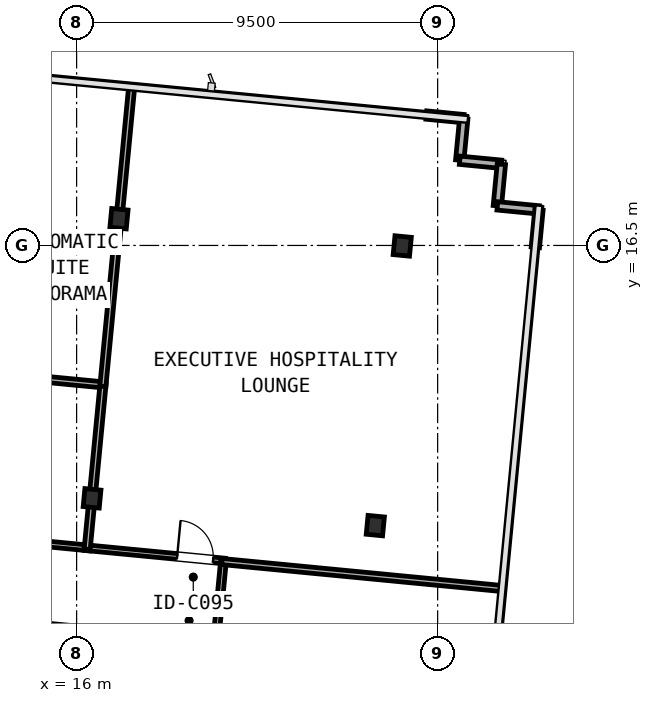
"""IFC4 building model, lengths in metres.
Left out: names, types, materials, properties, quantities, classifications, styles, units other than length and angle.
Written with IfcOpenShell. Run it as: python <this file> out.ifc"""

import sys

from ifc_helpers import new_model, si_unit, direction, frame, frame_2d, origin, origin_2d, place, context, subcontext, project, spatial, rectangle, i_section, extrude, element, fill, save


model = new_model("IFC4")
c1 = context("Model", 3, precision=1e-05, world=origin(), true_north=direction((0.0, 1.0)))
c2 = subcontext(c1, "Body", "Model", "MODEL_VIEW")
j1 = project(units=[si_unit("LENGTHUNIT", "METRE"), si_unit("PLANEANGLEUNIT", "RADIAN")], contexts=[c1])
p1 = place(None, origin())
s1 = spatial("IfcSite", under=j1, at=p1, CompositionType="ELEMENT")
p2 = place(p1, origin())
s2 = spatial("IfcBuilding", under=s1, at=p2, CompositionType="ELEMENT")
p3 = place(p2, frame((0.0, 0.0, 163.5)))
s3 = spatial("IfcBuildingStorey", under=s2, at=p3, CompositionType="ELEMENT", Elevation=163.5)
p4 = place(p3, frame((16.406, 9.846, 0.0), z_axis=(0.0, 0.0, 1.0), x_axis=(0.995396198367, -0.09584575252, 0.0)))
e1 = element("IfcColumn", 1, at=p4, inside=s3, PredefinedType="COLUMN", context=c2, shape_type="SweptSolid", body=[
    extrude(i_section(OverallWidth=0.424, OverallDepth=0.474, WebThickness=0.048, FlangeThickness=0.077, FilletRadius=0.031, at=origin_2d()), origin(), (0.0, 0.0, 1.0), 3.45),
])
for number, where, z_axis, x_axis in (
    (2, (17.115, 17.204, 0.0), (0.0, 0.0, 1.0), (0.995, -0.096, 0.0)),
    (3, (23.86, 9.128, 0.0), (0.0, 0.0, 1.0), (0.995, -0.096, 0.0)),
    (4, (24.568, 16.486, 0.0), (0.0, 0.0, 1.0), (0.995, -0.096, 0.0)),
):
    element("IfcColumn", number, at=place(p3, frame(where, z_axis=z_axis, x_axis=x_axis)), inside=s3, PredefinedType="COLUMN", context=c2, shape_type="SweptSolid", body=[
        extrude(i_section(OverallWidth=0.432, OverallDepth=0.498, WebThickness=0.056, FlangeThickness=0.089, FilletRadius=0.031, at=origin_2d()), origin(), (0.0, 0.0, 1.0), 3.45),
    ])
p5 = place(p3, frame((25.201, 19.931, 0.0), z_axis=(0.0, 0.0, 1.0), x_axis=(0.99541083642, -0.095693608655, 0.0)))
e5 = element("IfcWall", 5, at=p5, inside=s3, PredefinedType="STANDARD", context=c2, shape_type="SweptSolid", body=[
    extrude(rectangle(XDim=0.99, YDim=0.22, at=frame_2d((0.495, 0.0))), origin(), (0.0, 0.0, 1.0), 3.19),
])
p6 = place(p3, frame((26.187, 19.837, 0.0), z_axis=(0.0, 0.0, 1.0), x_axis=(-0.095657429048, -0.995414313875, 0.0)))
e6 = element("IfcWall", 6, at=p6, inside=s3, PredefinedType="STANDARD", context=c2, shape_type="SweptSolid", body=[
    extrude(rectangle(XDim=1.1, YDim=0.22, at=frame_2d((0.55, 0.0))), origin(), (0.0, 0.0, 1.0), 3.19),
])
p7 = place(p3, frame((26.082, 18.742, 0.0), z_axis=(0.0, 0.0, 1.0), x_axis=(0.995391116058, -0.095898519656, 0.0)))
e7 = element("IfcWall", 7, at=p7, inside=s3, PredefinedType="STANDARD", context=c2, shape_type="SweptSolid", body=[
    extrude(rectangle(XDim=1.1, YDim=0.22, at=frame_2d((0.55, 0.0))), origin(), (0.0, 0.0, 1.0), 3.19),
])
p8 = place(p3, frame((27.176, 18.636, 0.0), z_axis=(0.0, 0.0, 1.0), x_axis=(-0.095657429048, -0.995414313875, 0.0)))
e8 = element("IfcWall", 8, at=p8, inside=s3, PredefinedType="STANDARD", context=c2, shape_type="SweptSolid", body=[
    extrude(rectangle(XDim=1.1, YDim=0.22, at=frame_2d((0.55, 0.0))), origin(), (0.0, 0.0, 1.0), 3.19),
])
p9 = place(p3, frame((27.071, 17.541, 0.0), z_axis=(0.0, 0.0, 1.0), x_axis=(0.995391116058, -0.095898519656, 0.0)))
e9 = element("IfcWall", 9, at=p9, inside=s3, PredefinedType="STANDARD", context=c2, shape_type="SweptSolid", body=[
    extrude(rectangle(XDim=1.1, YDim=0.22, at=frame_2d((0.55, 0.0))), origin(), (0.0, 0.0, 1.0), 3.19),
])
p10 = place(p3, frame((28.166, 17.436, 0.0), z_axis=(0.0, 0.0, 1.0), x_axis=(-0.095693608655, -0.99541083642, 0.0)))
e10 = element("IfcWall", 10, at=p10, inside=s3, PredefinedType="STANDARD", context=c2, shape_type="SweptSolid", body=[
    extrude(rectangle(XDim=0.99, YDim=0.22, at=frame_2d((0.495, 0.0))), origin(), (0.0, 0.0, 1.0), 3.19),
])
p11 = place(p3, frame((8.28, 9.314, 0.0), z_axis=(0.0, 0.0, 1.0), x_axis=(0.995395467524, -0.095853342309, 0.0)))
e11 = element("IfcWall", 11, at=p11, inside=s3, PredefinedType="PARTITIONING", context=c2, shape_type="SweptSolid", body=[
    extrude(rectangle(XDim=8.12, YDim=0.15, at=frame_2d((4.06, 0.0))), origin(), (0.0, 0.0, 1.0), 2.479),
])
p12 = place(p11, frame((3.585, 0.0, 0.0)))
e12 = element("IfcOpeningElement", 12, at=p12, cuts=e11, PredefinedType="OPENING", context=c2, shape_type="SweptSolid", body=[
    extrude(rectangle(XDim=0.95, YDim=2.15, at=frame_2d((0.475, 1.075))), frame((0.0, 0.085, 0.0), z_axis=(0.0, -1.0, 0.0), x_axis=(1.0, 0.0, 0.0)), (0.0, 0.0, 1.0), 0.17),
])
p13 = place(p3, frame((16.199, 8.552, 0.0), z_axis=(0.0, 0.0, 1.0), x_axis=(0.995391104887, -0.095898635608, 0.0)))
e13 = element("IfcWall", 13, at=p13, inside=s3, PredefinedType="PARTITIONING", context=c2, shape_type="SweptSolid", body=[
    extrude(rectangle(XDim=3.722, YDim=0.15, at=frame_2d((1.861, 0.0))), origin(), (0.0, 0.0, 1.0), 2.479),
])
p14 = place(p13, frame((2.457, 0.0, 0.0)))
e14 = element("IfcOpeningElement", 14, at=p14, cuts=e13, PredefinedType="OPENING", context=c2, shape_type="SweptSolid", body=[
    extrude(rectangle(XDim=0.95, YDim=2.15, at=frame_2d((0.475, 1.075))), frame((0.0, 0.085, 0.0), z_axis=(0.0, -1.0, 0.0), x_axis=(1.0, 0.0, 0.0)), (0.0, 0.0, 1.0), 0.17),
])
p15 = place(p3, frame((16.156, 6.396, 0.0), z_axis=(0.0, 0.0, 1.0), x_axis=(-0.99539478422, 0.095860437863, 0.0)))
e15 = element("IfcWall", 15, at=p15, inside=s3, PredefinedType="PARTITIONING", context=c2, shape_type="SweptSolid", body=[
    extrude(rectangle(XDim=10.936, YDim=0.15, at=frame_2d((5.468, 0.0))), origin(), (0.0, 0.0, 1.0), 2.479),
])
p16 = place(p15, frame((3.675, 0.0, 0.0)))
e16 = element("IfcOpeningElement", 16, at=p16, cuts=e15, PredefinedType="OPENING", context=c2, shape_type="SweptSolid", body=[
    extrude(rectangle(XDim=0.85, YDim=2.05, at=frame_2d((0.425, 1.025))), frame((0.0, 0.085, 0.0), z_axis=(0.0, -1.0, 0.0), x_axis=(1.0, 0.0, 0.0)), (0.0, 0.0, 1.0), 0.17),
])
p17 = place(p3, frame((19.866, 8.219, 0.0), z_axis=(0.0, 0.0, 1.0), x_axis=(-0.095773447772, -0.995403157872, 0.0)))
e17 = element("IfcWall", 17, at=p17, inside=s3, PredefinedType="PARTITIONING", context=c2, shape_type="SweptSolid", body=[
    extrude(rectangle(XDim=2.21, YDim=0.15, at=frame_2d((1.105, 0.0))), origin(), (0.0, 0.0, 1.0), 2.718),
])
p18 = place(p3, frame((12.684, 13.218, 0.0), z_axis=(0.0, 0.0, 1.0), x_axis=(0.995396485523, -0.095842770251, 0.0)))
e18 = element("IfcWall", 18, at=p18, inside=s3, PredefinedType="PARTITIONING", context=c2, shape_type="SweptSolid", body=[
    extrude(rectangle(XDim=4.068, YDim=0.16, at=frame_2d((2.034, 0.0))), origin(), (0.0, 0.0, 1.0), 2.479),
])
p19 = place(p18, frame((0.386, 0.0, 0.0)))
e19 = element("IfcOpeningElement", 19, at=p19, cuts=e18, PredefinedType="OPENING", context=c2, shape_type="SweptSolid", body=[
    extrude(rectangle(XDim=0.95, YDim=2.15, at=frame_2d((0.475, 1.075))), frame((0.0, 0.09, 0.0), z_axis=(0.0, -1.0, 0.0), x_axis=(1.0, 0.0, 0.0)), (0.0, 0.0, 1.0), 0.18),
])
p20 = place(p3, frame((16.389, 9.671, 0.0), z_axis=(0.0, 0.0, 1.0), x_axis=(-0.095811626391, -0.995399483749, 0.0)))
e20 = element("IfcWall", 20, at=p20, inside=s3, PredefinedType="PARTITIONING", context=c2, shape_type="SweptSolid", body=[
    extrude(rectangle(XDim=1.172, YDim=0.16, at=frame_2d((0.586, 0.0))), origin(), (0.0, 0.0, 1.0), 2.479),
])
p21 = place(p3, frame((16.698, 12.872, 0.0), z_axis=(0.0, 0.0, 1.0), x_axis=(-0.095899197745, -0.995391050729, 0.0)))
e21 = element("IfcWall", 21, at=p21, inside=s3, PredefinedType="PARTITIONING", context=c2, shape_type="SweptSolid", body=[
    extrude(rectangle(XDim=2.864, YDim=0.16, at=frame_2d((1.432, 0.0))), origin(), (0.0, 0.0, 1.0), 2.479),
])
p22 = place(p3, frame((17.098, 17.029, 0.0), z_axis=(0.0, 0.0, 1.0), x_axis=(-0.095856690152, -0.995395145132, 0.0)))
e22 = element("IfcWall", 22, at=p22, inside=s3, PredefinedType="PARTITIONING", context=c2, shape_type="SweptSolid", body=[
    extrude(rectangle(XDim=4.256, YDim=0.16, at=frame_2d((2.128, 0.0))), origin(), (0.0, 0.0, 1.0), 2.479),
])
p23 = place(p3, frame((17.452, 20.708, 0.0), z_axis=(0.0, 0.0, 1.0), x_axis=(-0.095859866796, -0.995394839216, 0.0)))
e23 = element("IfcWall", 23, at=p23, inside=s3, PredefinedType="PARTITIONING", context=c2, shape_type="SweptSolid", body=[
    extrude(rectangle(XDim=3.344, YDim=0.16, at=frame_2d((1.672, 0.0))), origin(), (0.0, 0.0, 1.0), 3.19),
])
p24 = place(p3, frame((27.236, 7.469, 0.0), z_axis=(0.0, 0.0, 1.0), x_axis=(-0.995396228159, 0.095845443117, 0.0)))
e24 = element("IfcWall", 24, at=p24, inside=s3, PredefinedType="PARTITIONING", context=c2, shape_type="SweptSolid", body=[
    extrude(rectangle(XDim=7.448, YDim=0.16, at=frame_2d((3.724, 0.0))), origin(), (0.0, 0.0, 1.0), 2.558),
])
p25 = place(p14, frame((0.95, 0.0, 0.0), z_axis=(0.0, 0.0, 1.0), x_axis=(-1.0, 0.0, 0.0)))
e25 = element("IfcDoor", 25, at=p25, inside=s3, OperationType="SINGLE_SWING_LEFT", PredefinedType="DOOR", context=c2, shape_type="SweptSolid", body=[
    extrude(rectangle(XDim=0.95, YDim=2.15, at=frame_2d((0.475, 1.075))), frame((0.0, 0.025, 0.0), z_axis=(0.0, -1.0, 0.0), x_axis=(1.0, 0.0, 0.0)), (0.0, 0.0, 1.0), 0.05),
])
fill(e14, e25)
save(model, sys.argv[1])
